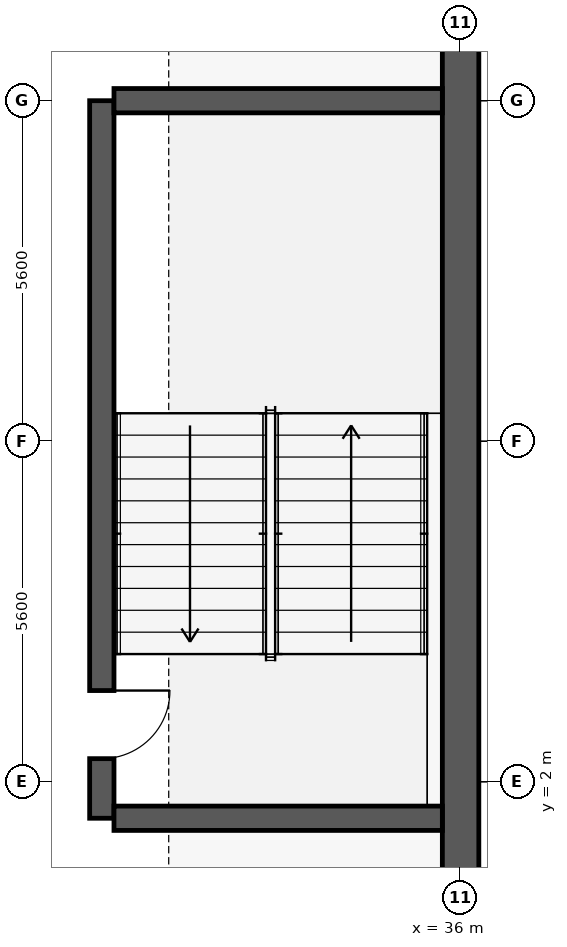
"""IFC4 building model, lengths in metres.
Left out: names, types, materials, properties, quantities, classifications, styles, units other than length and angle.
Written with IfcOpenShell. Run it as: python <this file> out.ifc"""

import sys

from ifc_helpers import new_model, si_unit, direction, frame, frame_2d, origin, place, context, subcontext, project, spatial, rectangle, extrude, element, fill, save


model = new_model("IFC4")
c1 = context("Model", 3, precision=1e-05, world=origin(), true_north=direction((0.0, 1.0)))
c2 = subcontext(c1, "Body", "Model", "MODEL_VIEW")
j1 = project(units=[si_unit("LENGTHUNIT", "METRE"), si_unit("PLANEANGLEUNIT", "RADIAN")], contexts=[c1])
p1 = place(None, origin())
s1 = spatial("IfcSite", under=j1, at=p1, CompositionType="ELEMENT")
p2 = place(p1, origin())
s2 = spatial("IfcBuilding", under=s1, at=p2, CompositionType="ELEMENT")
p3 = place(p2, frame((0.0, 0.0, -9.0)))
s3 = spatial("IfcBuildingStorey", under=s2, at=p3, CompositionType="ELEMENT", Elevation=-9.0)
p4 = place(p3, frame((36.0, 24.7, 0.0), z_axis=(0.0, 0.0, 1.0), x_axis=(0.0, -1.0, 0.0)))
e1 = element("IfcWall", 1, at=p4, inside=s3, PredefinedType="USERDEFINED", context=c2, shape_type="SweptSolid", body=[
    extrude(rectangle(XDim=48.4, YDim=0.6, at=frame_2d((24.2, 0.0))), origin(), (0.0, 0.0, 1.0), 4.24),
])
p5 = place(p3, frame((30.1, 13.2, 0.0), z_axis=(0.0, 0.0, 1.0), x_axis=(0.0, -1.0, 0.0)))
e2 = element("IfcWall", 2, at=p5, inside=s3, PredefinedType="SHEAR", context=c2, shape_type="SweptSolid", body=[
    extrude(rectangle(XDim=11.8, YDim=0.4, at=frame_2d((5.9, 0.0))), origin(), (0.0, 0.0, 1.0), 4.31),
])
p6 = place(p5, frame((9.7, 0.0, 0.0)))
e3 = element("IfcOpeningElement", 3, at=p6, cuts=e2, PredefinedType="OPENING", context=c2, shape_type="SweptSolid", body=[
    extrude(rectangle(XDim=1.12, YDim=2.22, at=frame_2d((0.56, 1.11))), frame((0.0, 0.21, 0.0), z_axis=(0.0, -1.0, 0.0), x_axis=(1.0, 0.0, 0.0)), (0.0, 0.0, 1.0), 0.42),
])
for number, where, z_axis, x_axis in (
    (4, (30.3, 1.4, 0.0), (0.0, 0.0, 1.0), (1.0, 0.0, 0.0)),
    (5, (30.3, 13.2, 0.0), (0.0, 0.0, 1.0), (1.0, 0.0, 0.0)),
):
    element("IfcWall", number, at=place(p3, frame(where, z_axis=z_axis, x_axis=x_axis)), inside=s3, PredefinedType="SHEAR", context=c2, shape_type="SweptSolid", body=[
        extrude(rectangle(XDim=5.4, YDim=0.4, at=frame_2d((2.7, 0.0))), origin(), (0.0, 0.0, 1.0), 4.31),
    ])
p7 = place(p6, origin())
e6 = element("IfcDoor", 6, at=p7, inside=s3, OperationType="SINGLE_SWING_LEFT", PredefinedType="DOOR", context=c2, shape_type="SweptSolid", body=[
    extrude(rectangle(XDim=1.12, YDim=2.22, at=frame_2d((0.56, 1.11))), frame((0.0, 0.025, 0.0), z_axis=(0.0, -1.0, 0.0), x_axis=(1.0, 0.0, 0.0)), (0.0, 0.0, 1.0), 0.05),
])
fill(e3, e6)
save(model, sys.argv[1])
